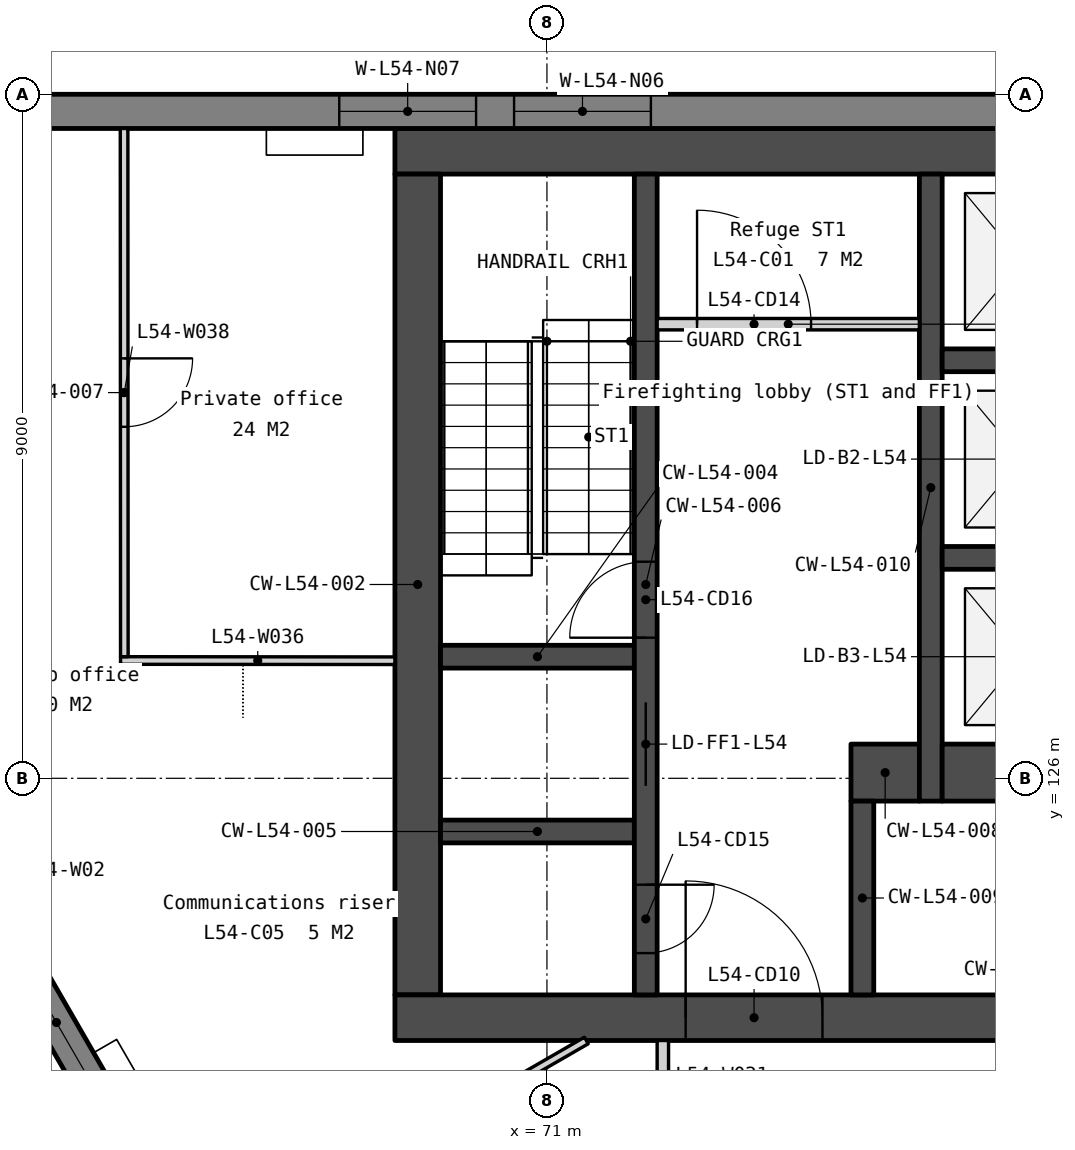
"""IFC4 building model, lengths in metres.
Left out: names, types, materials, properties, quantities, classifications, styles, units other than length and angle.
Written with IfcOpenShell. Run it as: python <this file> out.ifc"""

import sys

from ifc_helpers import new_model, si_unit, direction, frame, frame_2d, origin, place, context, subcontext, project, spatial, polyline, rectangle, outline, extrude, element, fill, save


model = new_model("IFC4")
c1 = context("Model", 3, precision=1e-05, world=origin(), true_north=direction((0.0, 1.0)))
c2 = subcontext(c1, "Body", "Model", "MODEL_VIEW")
j1 = project(units=[si_unit("LENGTHUNIT", "METRE"), si_unit("PLANEANGLEUNIT", "RADIAN")], contexts=[c1])
p1 = place(None, origin())
s1 = spatial("IfcSite", under=j1, at=p1, CompositionType="ELEMENT")
p2 = place(p1, origin())
s2 = spatial("IfcBuilding", under=s1, at=p2, CompositionType="ELEMENT")
p3 = place(p2, frame((0.0, 0.0, 215.3)))
s3 = spatial("IfcBuildingStorey", under=s2, at=p3, CompositionType="ELEMENT", Elevation=215.3)
p4 = place(p3, frame((69.0, 134.25, 0.0), z_axis=(0.0, 0.0, 1.0), x_axis=(1.0, 0.0, 0.0)))
e1 = element("IfcWall", 1, at=p4, inside=s3, PredefinedType="SOLIDWALL", context=c2, shape_type="SweptSolid", body=[
    extrude(rectangle(XDim=22.0, YDim=0.6, at=frame_2d((11.0, 0.0))), origin(), (0.0, 0.0, 1.0), 3.75),
])
p5 = place(p3, frame((69.3, 133.95, 0.0), z_axis=(0.0, 0.0, 1.0), x_axis=(0.0, -1.0, 0.0)))
e2 = element("IfcWall", 2, at=p5, inside=s3, PredefinedType="SOLIDWALL", context=c2, shape_type="SweptSolid", body=[
    extrude(rectangle(XDim=10.8, YDim=0.6, at=frame_2d((5.4, 0.0))), origin(), (0.0, 0.0, 1.0), 3.75),
])
p6 = place(p3, frame((69.0, 122.85, 0.0), z_axis=(0.0, 0.0, 1.0), x_axis=(1.0, 0.0, 0.0)))
e3 = element("IfcWall", 3, at=p6, inside=s3, PredefinedType="SOLIDWALL", context=c2, shape_type="SweptSolid", body=[
    extrude(rectangle(XDim=22.0, YDim=0.6, at=frame_2d((11.0, 0.0))), origin(), (0.0, 0.0, 1.0), 3.75),
])
p7 = place(p6, frame((16.375, 0.0, 0.0)))
e4 = element("IfcOpeningElement", 4, at=p7, cuts=e3, PredefinedType="OPENING", context=c2, shape_type="SweptSolid", body=[
    extrude(rectangle(XDim=1.8, YDim=2.1, at=frame_2d((0.9, 1.05))), frame((0.0, 0.31, 0.0), z_axis=(0.0, -1.0, 0.0), x_axis=(1.0, 0.0, 0.0)), (0.0, 0.0, 1.0), 0.62),
])
p8 = place(p6, frame((3.825, 0.0, 0.0)))
e5 = element("IfcOpeningElement", 5, at=p8, cuts=e3, PredefinedType="OPENING", context=c2, shape_type="SweptSolid", body=[
    extrude(rectangle(XDim=1.8, YDim=2.1, at=frame_2d((0.9, 1.05))), frame((0.0, 0.31, 0.0), z_axis=(0.0, -1.0, 0.0), x_axis=(1.0, 0.0, 0.0)), (0.0, 0.0, 1.0), 0.62),
])
p9 = place(p6, frame((12.85, 0.0, 0.0)))
e6 = element("IfcOpeningElement", 6, at=p9, cuts=e3, PredefinedType="OPENING", context=c2, shape_type="SweptSolid", body=[
    extrude(rectangle(XDim=1.5, YDim=2.1, at=frame_2d((0.75, 1.05))), frame((0.0, 0.31, 0.0), z_axis=(0.0, -1.0, 0.0), x_axis=(1.0, 0.0, 0.0)), (0.0, 0.0, 1.0), 0.62),
])
for number, where, z_axis, x_axis in (
    (7, (69.6, 127.6, 0.0), (0.0, 0.0, 1.0), (1.0, 0.0, 0.0)),
    (8, (69.6, 125.3, 0.0), (0.0, 0.0, 1.0), (1.0, 0.0, 0.0)),
):
    element("IfcWall", number, at=place(p3, frame(where, z_axis=z_axis, x_axis=x_axis)), inside=s3, PredefinedType="SOLIDWALL", context=c2, shape_type="SweptSolid", body=[
        extrude(rectangle(XDim=2.55, YDim=0.3, at=frame_2d((1.275, 0.0))), origin(), (0.0, 0.0, 1.0), 3.75),
    ])
p10 = place(p3, frame((72.3, 133.95, 0.0), z_axis=(0.0, 0.0, 1.0), x_axis=(0.0, -1.0, 0.0)))
e9 = element("IfcWall", 9, at=p10, inside=s3, PredefinedType="SOLIDWALL", context=c2, shape_type="SweptSolid", body=[
    extrude(rectangle(XDim=10.8, YDim=0.3, at=frame_2d((5.4, 0.0))), origin(), (0.0, 0.0, 1.0), 3.75),
])
p11 = place(p10, frame((6.95, 0.0, 0.0)))
e10 = element("IfcOpeningElement", 10, at=p11, cuts=e9, PredefinedType="OPENING", context=c2, shape_type="SweptSolid", body=[
    extrude(rectangle(XDim=1.1, YDim=2.1, at=frame_2d((0.55, 1.05))), frame((0.0, 0.16, 0.0), z_axis=(0.0, -1.0, 0.0), x_axis=(1.0, 0.0, 0.0)), (0.0, 0.0, 1.0), 0.32),
])
p12 = place(p10, frame((9.35, 0.0, 0.0)))
e11 = element("IfcOpeningElement", 11, at=p12, cuts=e9, PredefinedType="OPENING", context=c2, shape_type="SweptSolid", body=[
    extrude(rectangle(XDim=0.9, YDim=2.1, at=frame_2d((0.45, 1.05))), frame((0.0, 0.16, 0.0), z_axis=(0.0, -1.0, 0.0), x_axis=(1.0, 0.0, 0.0)), (0.0, 0.0, 1.0), 0.32),
])
p13 = place(p10, frame((5.1, 0.0, 0.0)))
e12 = element("IfcOpeningElement", 12, at=p13, cuts=e9, PredefinedType="OPENING", context=c2, shape_type="SweptSolid", body=[
    extrude(rectangle(XDim=1.0, YDim=2.1, at=frame_2d((0.5, 1.05))), frame((0.0, 0.16, 0.0), z_axis=(0.0, -1.0, 0.0), x_axis=(1.0, 0.0, 0.0)), (0.0, 0.0, 1.0), 0.32),
])
p14 = place(p3, frame((72.45, 131.975, 0.0), z_axis=(0.0, 0.0, 1.0), x_axis=(1.0, 0.0, 0.0)))
e13 = element("IfcWall", 13, at=p14, inside=s3, PredefinedType="PARTITIONING", context=c2, shape_type="SweptSolid", body=[
    extrude(rectangle(XDim=3.45, YDim=0.15, at=frame_2d((1.725, 0.0))), origin(), (0.0, 0.0, 1.0), 3.75),
])
p15 = place(p14, frame((0.525, 0.0, 0.0)))
e14 = element("IfcOpeningElement", 14, at=p15, cuts=e13, PredefinedType="OPENING", context=c2, shape_type="SweptSolid", body=[
    extrude(rectangle(XDim=1.5, YDim=2.1, at=frame_2d((0.75, 1.05))), frame((0.0, 0.085, 0.0), z_axis=(0.0, -1.0, 0.0), x_axis=(1.0, 0.0, 0.0)), (0.0, 0.0, 1.0), 0.17),
])
p16 = place(p3, frame((75.0, 126.075, 0.0), z_axis=(0.0, 0.0, 1.0), x_axis=(1.0, 0.0, 0.0)))
e15 = element("IfcWall", 15, at=p16, inside=s3, PredefinedType="SOLIDWALL", context=c2, shape_type="SweptSolid", body=[
    extrude(rectangle(XDim=0.9, YDim=0.75, at=frame_2d((0.45, 0.0))), origin(), (0.0, 0.0, 1.0), 3.75),
])
p17 = place(p3, frame((75.15, 125.7, 0.0), z_axis=(0.0, 0.0, 1.0), x_axis=(0.0, -1.0, 0.0)))
e16 = element("IfcWall", 16, at=p17, inside=s3, PredefinedType="SOLIDWALL", context=c2, shape_type="SweptSolid", body=[
    extrude(rectangle(XDim=2.55, YDim=0.3, at=frame_2d((1.275, 0.0))), origin(), (0.0, 0.0, 1.0), 3.75),
])
p18 = place(p3, frame((76.05, 133.95, 0.0), z_axis=(0.0, 0.0, 1.0), x_axis=(0.0, -1.0, 0.0)))
e17 = element("IfcWall", 17, at=p18, inside=s3, PredefinedType="SOLIDWALL", context=c2, shape_type="SweptSolid", body=[
    extrude(rectangle(XDim=8.25, YDim=0.3, at=frame_2d((4.125, 0.0))), origin(), (0.0, 0.0, 1.0), 3.75),
])
for number, where, z_axis, x_axis in (
    (18, (76.2, 131.5, 0.0), (0.0, 0.0, 1.0), (1.0, 0.0, 0.0)),
    (19, (76.2, 128.9, 0.0), (0.0, 0.0, 1.0), (1.0, 0.0, 0.0)),
):
    element("IfcWall", number, at=place(p3, frame(where, z_axis=z_axis, x_axis=x_axis)), inside=s3, PredefinedType="SOLIDWALL", context=c2, shape_type="SweptSolid", body=[
        extrude(rectangle(XDim=2.1, YDim=0.3, at=frame_2d((1.05, 0.0))), origin(), (0.0, 0.0, 1.0), 3.75),
    ])
p19 = place(p3, frame((76.2, 126.075, 0.0), z_axis=(0.0, 0.0, 1.0), x_axis=(1.0, 0.0, 0.0)))
e20 = element("IfcWall", 20, at=p19, inside=s3, PredefinedType="SOLIDWALL", context=c2, shape_type="SweptSolid", body=[
    extrude(rectangle(XDim=2.1, YDim=0.75, at=frame_2d((1.05, 0.0))), origin(), (0.0, 0.0, 1.0), 3.75),
])
p20 = place(p3, frame((99.365, 134.775, -0.15), z_axis=(0.0, 0.0, 1.0), x_axis=(-1.0, 0.0, 0.0)))
e21 = element("IfcWall", 21, at=p20, inside=s3, PredefinedType="SOLIDWALL", context=c2, shape_type="SweptSolid", body=[
    extrude(outline(polyline([(38.729, 0.0), (38.729, 3.9), (0.0, 3.9), (0.0, 0.0), (38.729, 0.0)])), frame((0.0, 0.225, 0.0), z_axis=(0.0, -1.0, 0.0), x_axis=(1.0, 0.0, 0.0)), (0.0, 0.0, 1.0), 0.45),
])
p21 = place(p20, frame((0.776, 0.0, 0.95)))
e22 = element("IfcOpeningElement", 22, at=p21, cuts=e21, PredefinedType="OPENING", context=c2, shape_type="SweptSolid", body=[
    extrude(rectangle(XDim=1.2, YDim=2.2, at=frame_2d((0.6, 1.1))), frame((0.0, 0.235, 0.0), z_axis=(0.0, -1.0, 0.0), x_axis=(1.0, 0.0, 0.0)), (0.0, 0.0, 1.0), 0.47),
])
p22 = place(p20, frame((7.632, 0.0, 0.95)))
e23 = element("IfcOpeningElement", 23, at=p22, cuts=e21, PredefinedType="OPENING", context=c2, shape_type="SweptSolid", body=[
    extrude(rectangle(XDim=1.8, YDim=2.2, at=frame_2d((0.9, 1.1))), frame((0.0, 0.235, 0.0), z_axis=(0.0, -1.0, 0.0), x_axis=(1.0, 0.0, 0.0)), (0.0, 0.0, 1.0), 0.47),
])
p23 = place(p20, frame((9.932, 0.0, 0.95)))
e24 = element("IfcOpeningElement", 24, at=p23, cuts=e21, PredefinedType="OPENING", context=c2, shape_type="SweptSolid", body=[
    extrude(rectangle(XDim=1.8, YDim=2.2, at=frame_2d((0.9, 1.1))), frame((0.0, 0.235, 0.0), z_axis=(0.0, -1.0, 0.0), x_axis=(1.0, 0.0, 0.0)), (0.0, 0.0, 1.0), 0.47),
])
p24 = place(p20, frame((17.315, 0.0, 0.95)))
e25 = element("IfcOpeningElement", 25, at=p24, cuts=e21, PredefinedType="OPENING", context=c2, shape_type="SweptSolid", body=[
    extrude(rectangle(XDim=1.8, YDim=2.2, at=frame_2d((0.9, 1.1))), frame((0.0, 0.235, 0.0), z_axis=(0.0, -1.0, 0.0), x_axis=(1.0, 0.0, 0.0)), (0.0, 0.0, 1.0), 0.47),
])
p25 = place(p20, frame((19.615, 0.0, 0.95)))
e26 = element("IfcOpeningElement", 26, at=p25, cuts=e21, PredefinedType="OPENING", context=c2, shape_type="SweptSolid", body=[
    extrude(rectangle(XDim=1.8, YDim=2.2, at=frame_2d((0.9, 1.1))), frame((0.0, 0.235, 0.0), z_axis=(0.0, -1.0, 0.0), x_axis=(1.0, 0.0, 0.0)), (0.0, 0.0, 1.0), 0.47),
])
p26 = place(p20, frame((26.997, 0.0, 0.95)))
e27 = element("IfcOpeningElement", 27, at=p26, cuts=e21, PredefinedType="OPENING", context=c2, shape_type="SweptSolid", body=[
    extrude(rectangle(XDim=1.8, YDim=2.2, at=frame_2d((0.9, 1.1))), frame((0.0, 0.235, 0.0), z_axis=(0.0, -1.0, 0.0), x_axis=(1.0, 0.0, 0.0)), (0.0, 0.0, 1.0), 0.47),
])
p27 = place(p20, frame((29.297, 0.0, 0.95)))
e28 = element("IfcOpeningElement", 28, at=p27, cuts=e21, PredefinedType="OPENING", context=c2, shape_type="SweptSolid", body=[
    extrude(rectangle(XDim=1.8, YDim=2.2, at=frame_2d((0.9, 1.1))), frame((0.0, 0.235, 0.0), z_axis=(0.0, -1.0, 0.0), x_axis=(1.0, 0.0, 0.0)), (0.0, 0.0, 1.0), 0.47),
])
p28 = place(p20, frame((36.753, 0.0, 0.95)))
e29 = element("IfcOpeningElement", 29, at=p28, cuts=e21, PredefinedType="OPENING", context=c2, shape_type="SweptSolid", body=[
    extrude(rectangle(XDim=1.2, YDim=2.2, at=frame_2d((0.6, 1.1))), frame((0.0, 0.235, 0.0), z_axis=(0.0, -1.0, 0.0), x_axis=(1.0, 0.0, 0.0)), (0.0, 0.0, 1.0), 0.47),
])
p29 = place(p3, frame((59.13, 132.168, -0.15), z_axis=(0.0, 0.0, 1.0), x_axis=(0.500002199942, -0.866024133644, 0.0)))
e30 = element("IfcWall", 30, at=p29, inside=s3, PredefinedType="SOLIDWALL", context=c2, shape_type="SweptSolid", body=[
    extrude(outline(polyline([(38.729, 0.0), (38.729, 3.9), (0.0, 3.9), (0.0, 0.0), (38.729, 0.0)])), frame((0.0, 0.225, 0.0), z_axis=(0.0, -1.0, 0.0), x_axis=(1.0, 0.0, 0.0)), (0.0, 0.0, 1.0), 0.45),
])
p30 = place(p29, frame((0.776, 0.0, 0.95)))
e31 = element("IfcOpeningElement", 31, at=p30, cuts=e30, PredefinedType="OPENING", context=c2, shape_type="SweptSolid", body=[
    extrude(rectangle(XDim=1.2, YDim=2.2, at=frame_2d((0.6, 1.1))), frame((0.0, 0.235, 0.0), z_axis=(0.0, -1.0, 0.0), x_axis=(1.0, 0.0, 0.0)), (0.0, 0.0, 1.0), 0.47),
])
p31 = place(p29, frame((7.632, 0.0, 0.95)))
e32 = element("IfcOpeningElement", 32, at=p31, cuts=e30, PredefinedType="OPENING", context=c2, shape_type="SweptSolid", body=[
    extrude(rectangle(XDim=1.8, YDim=2.2, at=frame_2d((0.9, 1.1))), frame((0.0, 0.235, 0.0), z_axis=(0.0, -1.0, 0.0), x_axis=(1.0, 0.0, 0.0)), (0.0, 0.0, 1.0), 0.47),
])
p32 = place(p29, frame((9.932, 0.0, 0.95)))
e33 = element("IfcOpeningElement", 33, at=p32, cuts=e30, PredefinedType="OPENING", context=c2, shape_type="SweptSolid", body=[
    extrude(rectangle(XDim=1.8, YDim=2.2, at=frame_2d((0.9, 1.1))), frame((0.0, 0.235, 0.0), z_axis=(0.0, -1.0, 0.0), x_axis=(1.0, 0.0, 0.0)), (0.0, 0.0, 1.0), 0.47),
])
p33 = place(p29, frame((17.315, 0.0, 0.95)))
e34 = element("IfcOpeningElement", 34, at=p33, cuts=e30, PredefinedType="OPENING", context=c2, shape_type="SweptSolid", body=[
    extrude(rectangle(XDim=1.8, YDim=2.2, at=frame_2d((0.9, 1.1))), frame((0.0, 0.235, 0.0), z_axis=(0.0, -1.0, 0.0), x_axis=(1.0, 0.0, 0.0)), (0.0, 0.0, 1.0), 0.47),
])
p34 = place(p29, frame((19.615, 0.0, 0.95)))
e35 = element("IfcOpeningElement", 35, at=p34, cuts=e30, PredefinedType="OPENING", context=c2, shape_type="SweptSolid", body=[
    extrude(rectangle(XDim=1.8, YDim=2.2, at=frame_2d((0.9, 1.1))), frame((0.0, 0.235, 0.0), z_axis=(0.0, -1.0, 0.0), x_axis=(1.0, 0.0, 0.0)), (0.0, 0.0, 1.0), 0.47),
])
p35 = place(p29, frame((26.997, 0.0, 0.95)))
e36 = element("IfcOpeningElement", 36, at=p35, cuts=e30, PredefinedType="OPENING", context=c2, shape_type="SweptSolid", body=[
    extrude(rectangle(XDim=1.8, YDim=2.2, at=frame_2d((0.9, 1.1))), frame((0.0, 0.235, 0.0), z_axis=(0.0, -1.0, 0.0), x_axis=(1.0, 0.0, 0.0)), (0.0, 0.0, 1.0), 0.47),
])
p36 = place(p29, frame((29.297, 0.0, 0.95)))
e37 = element("IfcOpeningElement", 37, at=p36, cuts=e30, PredefinedType="OPENING", context=c2, shape_type="SweptSolid", body=[
    extrude(rectangle(XDim=1.8, YDim=2.2, at=frame_2d((0.9, 1.1))), frame((0.0, 0.235, 0.0), z_axis=(0.0, -1.0, 0.0), x_axis=(1.0, 0.0, 0.0)), (0.0, 0.0, 1.0), 0.47),
])
p37 = place(p29, frame((36.753, 0.0, 0.95)))
e38 = element("IfcOpeningElement", 38, at=p37, cuts=e30, PredefinedType="OPENING", context=c2, shape_type="SweptSolid", body=[
    extrude(rectangle(XDim=1.2, YDim=2.2, at=frame_2d((0.6, 1.1))), frame((0.0, 0.235, 0.0), z_axis=(0.0, -1.0, 0.0), x_axis=(1.0, 0.0, 0.0)), (0.0, 0.0, 1.0), 0.47),
])
p38 = place(p3, frame((66.587, 119.703, 0.0), z_axis=(0.0, 0.0, 1.0), x_axis=(0.866023511746, 0.500003277092, 0.0)))
e39 = element("IfcWall", 39, at=p38, inside=s3, PredefinedType="PARTITIONING", context=c2, shape_type="SweptSolid", body=[
    extrude(rectangle(XDim=5.694, YDim=0.1, at=frame_2d((2.847, 0.0))), origin(), (0.0, 0.0, 1.0), 3.75),
])
p39 = place(p38, frame((2.397, 0.0, 0.0)))
e40 = element("IfcOpeningElement", 40, at=p39, cuts=e39, PredefinedType="OPENING", context=c2, shape_type="SweptSolid", body=[
    extrude(rectangle(XDim=0.9, YDim=2.1, at=frame_2d((0.45, 1.05))), frame((0.0, 0.06, 0.0), z_axis=(0.0, -1.0, 0.0), x_axis=(1.0, 0.0, 0.0)), (0.0, 0.0, 1.0), 0.12),
])
p40 = place(p3, frame((72.525, 120.05, 0.0), z_axis=(0.0, 0.0, 1.0), x_axis=(0.0, 1.0, 0.0)))
e41 = element("IfcWall", 41, at=p40, inside=s3, PredefinedType="PARTITIONING", context=c2, shape_type="SweptSolid", body=[
    extrude(rectangle(XDim=2.5, YDim=0.15, at=frame_2d((1.25, 0.0))), origin(), (0.0, 0.0, 1.0), 3.75),
])
p41 = place(p40, frame((0.75, 0.0, 0.0)))
e42 = element("IfcOpeningElement", 42, at=p41, cuts=e41, PredefinedType="OPENING", context=c2, shape_type="SweptSolid", body=[
    extrude(rectangle(XDim=1.0, YDim=2.1, at=frame_2d((0.5, 1.05))), frame((0.0, 0.085, 0.0), z_axis=(0.0, -1.0, 0.0), x_axis=(1.0, 0.0, 0.0)), (0.0, 0.0, 1.0), 0.17),
])
p42 = place(p3, frame((65.39, 127.55, 0.0), z_axis=(0.0, 0.0, 1.0), x_axis=(0.99999967067, -0.000811578253, 0.0)))
e43 = element("IfcWall", 43, at=p42, inside=s3, PredefinedType="PARTITIONING", context=c2, shape_type="SweptSolid", body=[
    extrude(rectangle(XDim=3.61, YDim=0.1, at=frame_2d((1.805, 0.0))), origin(), (0.0, 0.0, 1.0), 3.75),
])
p43 = place(p3, frame((65.437, 134.55, 0.0), z_axis=(0.0, 0.0, 1.0), x_axis=(0.000491814737, -0.999999879059, 0.0)))
e44 = element("IfcWall", 44, at=p43, inside=s3, PredefinedType="PARTITIONING", context=c2, shape_type="SweptSolid", body=[
    extrude(rectangle(XDim=6.95, YDim=0.1, at=frame_2d((3.475, 0.0))), origin(), (0.0, 0.0, 1.0), 3.75),
])
p44 = place(p43, frame((3.025, 0.0, 0.0)))
e45 = element("IfcOpeningElement", 45, at=p44, cuts=e44, PredefinedType="OPENING", context=c2, shape_type="SweptSolid", body=[
    extrude(rectangle(XDim=0.9, YDim=2.1, at=frame_2d((0.45, 1.05))), frame((0.0, 0.06, 0.0), z_axis=(0.0, -1.0, 0.0), x_axis=(1.0, 0.0, 0.0)), (0.0, 0.0, 1.0), 0.12),
])
p45 = place(p11, origin())
e46 = element("IfcDoor", 46, at=p45, inside=s3, OperationType="SLIDING_TO_LEFT", PredefinedType="DOOR", context=c2, shape_type="SweptSolid", body=[
    extrude(rectangle(XDim=1.1, YDim=2.1, at=frame_2d((0.55, 1.05))), frame((0.0, 0.025, 0.0), z_axis=(0.0, -1.0, 0.0), x_axis=(1.0, 0.0, 0.0)), (0.0, 0.0, 1.0), 0.05),
])
fill(e10, e46)
p46 = place(p8, origin())
e47 = element("IfcDoor", 47, at=p46, inside=s3, OperationType="DOUBLE_DOOR_DOUBLE_SWING", PredefinedType="DOOR", context=c2, shape_type="SweptSolid", body=[
    extrude(rectangle(XDim=1.8, YDim=2.1, at=frame_2d((0.9, 1.05))), frame((0.0, 0.025, 0.0), z_axis=(0.0, -1.0, 0.0), x_axis=(1.0, 0.0, 0.0)), (0.0, 0.0, 1.0), 0.05),
])
fill(e5, e47)
p47 = place(p15, origin())
e48 = element("IfcDoor", 48, at=p47, inside=s3, OperationType="DOUBLE_DOOR_DOUBLE_SWING", PredefinedType="DOOR", context=c2, shape_type="SweptSolid", body=[
    extrude(rectangle(XDim=1.5, YDim=2.1, at=frame_2d((0.75, 1.05))), frame((0.0, 0.025, 0.0), z_axis=(0.0, -1.0, 0.0), x_axis=(1.0, 0.0, 0.0)), (0.0, 0.0, 1.0), 0.05),
])
fill(e14, e48)
p48 = place(p12, origin())
e49 = element("IfcDoor", 49, at=p48, inside=s3, OperationType="SINGLE_SWING_LEFT", PredefinedType="DOOR", context=c2, shape_type="SweptSolid", body=[
    extrude(rectangle(XDim=0.9, YDim=2.1, at=frame_2d((0.45, 1.05))), frame((0.0, 0.025, 0.0), z_axis=(0.0, -1.0, 0.0), x_axis=(1.0, 0.0, 0.0)), (0.0, 0.0, 1.0), 0.05),
])
fill(e11, e49)
p49 = place(p13, origin())
e50 = element("IfcDoor", 50, at=p49, inside=s3, OperationType="SINGLE_SWING_RIGHT", PredefinedType="DOOR", context=c2, shape_type="SweptSolid", body=[
    extrude(rectangle(XDim=1.0, YDim=2.1, at=frame_2d((0.5, 1.05))), frame((0.0, 0.025, 0.0), z_axis=(0.0, -1.0, 0.0), x_axis=(1.0, 0.0, 0.0)), (0.0, 0.0, 1.0), 0.05),
])
fill(e12, e50)
p50 = place(p26, origin())
e51 = element("IfcWindow", 51, at=p50, inside=s3, PartitioningType="SINGLE_PANEL", PredefinedType="WINDOW", context=c2, shape_type="SweptSolid", body=[
    extrude(rectangle(XDim=1.8, YDim=2.2, at=frame_2d((0.9, 1.1))), frame((0.0, 0.03, 0.0), z_axis=(0.0, -1.0, 0.0), x_axis=(1.0, 0.0, 0.0)), (0.0, 0.0, 1.0), 0.06),
])
fill(e27, e51)
p51 = place(p27, origin())
e52 = element("IfcWindow", 52, at=p51, inside=s3, PartitioningType="SINGLE_PANEL", PredefinedType="WINDOW", context=c2, shape_type="SweptSolid", body=[
    extrude(rectangle(XDim=1.8, YDim=2.2, at=frame_2d((0.9, 1.1))), frame((0.0, 0.03, 0.0), z_axis=(0.0, -1.0, 0.0), x_axis=(1.0, 0.0, 0.0)), (0.0, 0.0, 1.0), 0.06),
])
fill(e28, e52)
p52 = place(p32, origin())
e53 = element("IfcWindow", 53, at=p52, inside=s3, PartitioningType="SINGLE_PANEL", PredefinedType="WINDOW", context=c2, shape_type="SweptSolid", body=[
    extrude(rectangle(XDim=1.8, YDim=2.2, at=frame_2d((0.9, 1.1))), frame((0.0, 0.03, 0.0), z_axis=(0.0, -1.0, 0.0), x_axis=(1.0, 0.0, 0.0)), (0.0, 0.0, 1.0), 0.06),
])
fill(e33, e53)
p53 = place(p44, origin())
e54 = element("IfcDoor", 54, at=p53, inside=s3, OperationType="SINGLE_SWING_LEFT", PredefinedType="DOOR", context=c2, shape_type="SweptSolid", body=[
    extrude(rectangle(XDim=0.9, YDim=2.1, at=frame_2d((0.45, 1.05))), frame((0.0, 0.025, 0.0), z_axis=(0.0, -1.0, 0.0), x_axis=(1.0, 0.0, 0.0)), (0.0, 0.0, 1.0), 0.05),
])
fill(e45, e54)
save(model, sys.argv[1])
